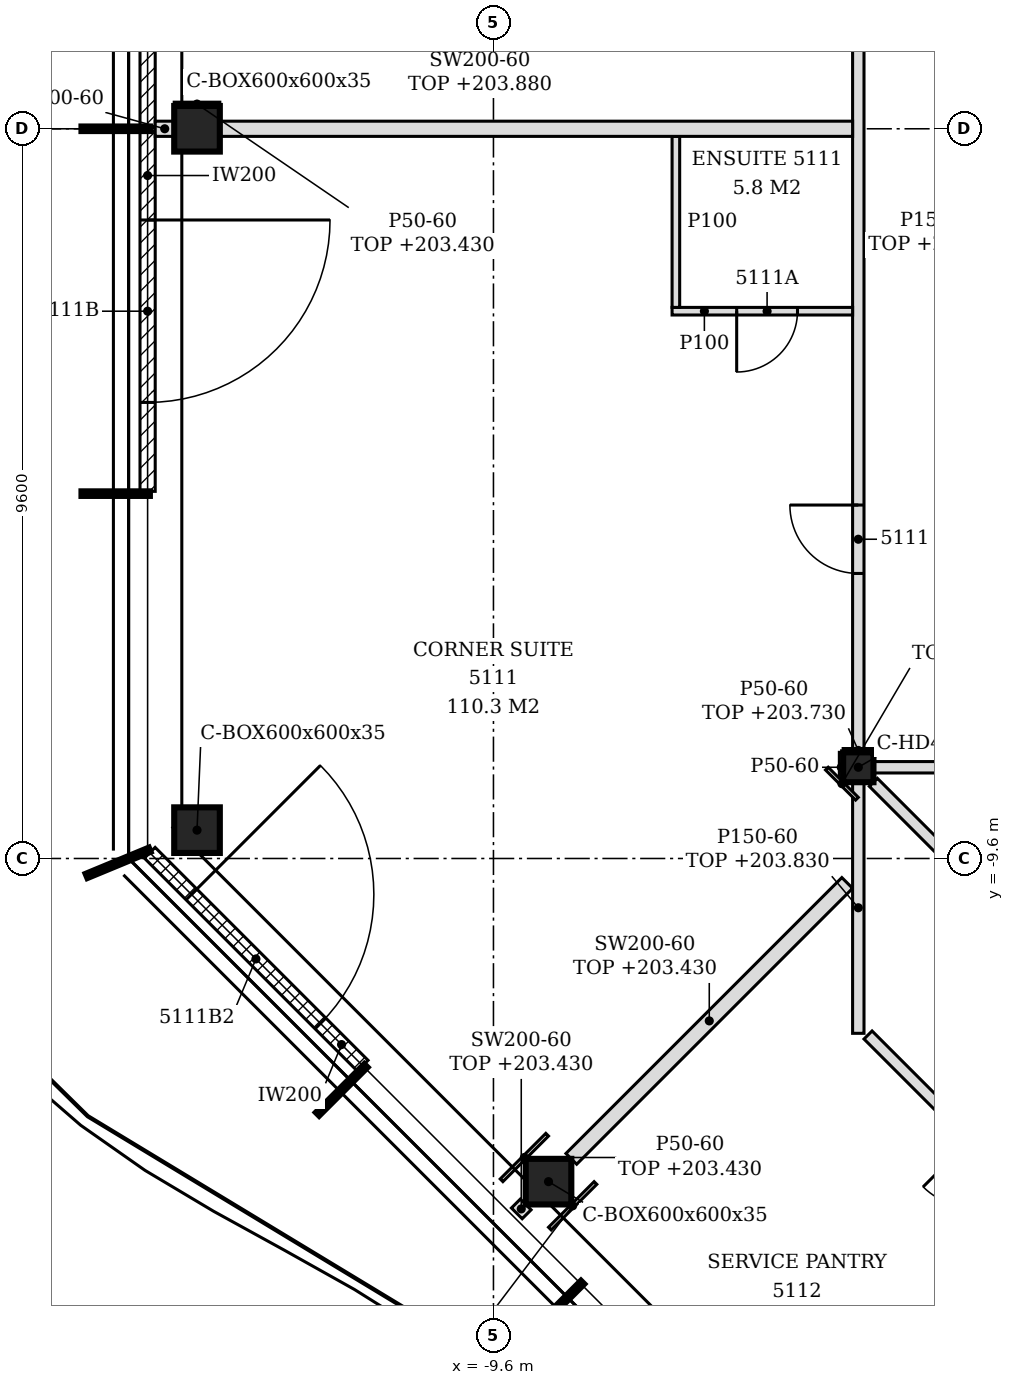
"""IFC4 building model, lengths in metres.
Left out: names, types, materials, properties, quantities, classifications, styles, units other than length and angle.
Written with IfcOpenShell. Run it as: python <this file> out.ifc"""

import sys

from ifc_helpers import new_model, si_unit, direction, frame, frame_2d, origin, origin_2d, place, context, subcontext, project, spatial, polyline, rectangle, hollow_rectangle, i_section, outline, extrude, clip, halfspace, element, fill, save


model = new_model("IFC4")
c1 = context("Model", 3, precision=1e-05, world=origin(), true_north=direction((0.0, 1.0)))
c2 = subcontext(c1, "Body", "Model", "MODEL_VIEW")
j1 = project(units=[si_unit("LENGTHUNIT", "METRE"), si_unit("PLANEANGLEUNIT", "RADIAN")], contexts=[c1])
p1 = place(None, origin())
s1 = spatial("IfcSite", under=j1, at=p1, CompositionType="ELEMENT")
p2 = place(p1, origin())
s2 = spatial("IfcBuilding", under=s1, at=p2, CompositionType="ELEMENT")
p3 = place(p2, frame((0.0, 0.0, 201.0)))
s3 = spatial("IfcBuildingStorey", under=s2, at=p3, CompositionType="ELEMENT", Elevation=201.0)
p4 = place(p3, frame((-13.5, 0.0, -0.15), z_axis=(0.0, 0.0, 1.0), x_axis=(1.0, 0.0, 0.0)))
e1 = element("IfcColumn", 1, at=p4, inside=s3, PredefinedType="COLUMN", context=c2, shape_type="Clipping", body=[
    clip(extrude(hollow_rectangle(XDim=0.6, YDim=0.6, WallThickness=0.035, at=origin_2d()), origin(), (0.0, 0.0, 1.0), 3.5), halfspace(frame((0.0, 0.0, 0.011), z_axis=(0.0, 0.0, 1.0), x_axis=(1.0, 0.0, 0.0)), True)),
])
for number, where, z_axis, x_axis in (
    (2, (-13.5, -9.227, -0.15), (0.0, 0.0, 1.0), (1.0, 0.0, 0.0)),
    (3, (-8.876, -13.852, -0.15), (0.0, 0.0, 1.0), (1.0, 0.0, 0.0)),
):
    element("IfcColumn", number, at=place(p3, frame(where, z_axis=z_axis, x_axis=x_axis)), inside=s3, PredefinedType="COLUMN", context=c2, shape_type="Clipping", body=[
        clip(clip(extrude(hollow_rectangle(XDim=0.6, YDim=0.6, WallThickness=0.035, at=origin_2d()), origin(), (0.0, 0.0, 1.0), 3.5), halfspace(frame((0.0, 0.0, 0.011), z_axis=(0.0, 0.0, 1.0), x_axis=(1.0, 0.0, 0.0)), True)), halfspace(frame((0.0, 0.0, 3.095), z_axis=(0.0, 0.0, 1.0), x_axis=(1.0, 0.0, 0.0)), False)),
    ])
p5 = place(p3, frame((-4.8, -8.4, -0.15), z_axis=(0.0, 0.0, 1.0), x_axis=(1.0, 0.0, 0.0)))
e4 = element("IfcColumn", 4, at=p5, inside=s3, PredefinedType="COLUMN", context=c2, shape_type="SweptSolid", body=[
    extrude(i_section(OverallWidth=0.399, OverallDepth=0.393, WebThickness=0.023, FlangeThickness=0.037, FilletRadius=0.015, at=origin_2d()), origin(), (0.0, 0.0, 1.0), 3.5),
])
p6 = place(p3, frame((-14.15, 4.77, 0.0), z_axis=(0.0, 0.0, 1.0), x_axis=(0.0, -1.0, 0.0)))
e5 = element("IfcWall", 5, at=p6, inside=s3, PredefinedType="NOTDEFINED", context=c2, shape_type="SweptSolid", body=[
    extrude(rectangle(XDim=4.74, YDim=0.2, at=frame_2d((2.37, 0.0))), origin(), (0.0, 0.0, 1.0), 3.35),
])
p7 = place(p6, frame((1.17, 0.0, 0.0)))
e6 = element("IfcOpeningElement", 6, at=p7, cuts=e5, PredefinedType="OPENING", context=c2, shape_type="SweptSolid", body=[
    extrude(rectangle(XDim=2.4, YDim=2.4, at=frame_2d((1.2, 1.2))), frame((0.0, 0.11, 0.0), z_axis=(0.0, -1.0, 0.0), x_axis=(1.0, 0.0, 0.0)), (0.0, 0.0, 1.0), 0.22),
])
p8 = place(p3, frame((-14.15, -0.03, 0.0), z_axis=(0.0, 0.0, 1.0), x_axis=(0.0, -1.0, 0.0)))
e7 = element("IfcWall", 7, at=p8, inside=s3, PredefinedType="NOTDEFINED", context=c2, shape_type="SweptSolid", body=[
    extrude(rectangle(XDim=4.74, YDim=0.2, at=frame_2d((2.37, 0.0))), origin(), (0.0, 0.0, 1.0), 3.35),
])
p9 = place(p8, frame((1.17, 0.0, 0.0)))
e8 = element("IfcOpeningElement", 8, at=p9, cuts=e7, PredefinedType="OPENING", context=c2, shape_type="SweptSolid", body=[
    extrude(rectangle(XDim=2.4, YDim=2.4, at=frame_2d((1.2, 1.2))), frame((0.0, 0.11, 0.0), z_axis=(0.0, -1.0, 0.0), x_axis=(1.0, 0.0, 0.0)), (0.0, 0.0, 1.0), 0.22),
])
p10 = place(p3, frame((-14.122, -9.525, 0.0), z_axis=(0.0, 0.0, 1.0), x_axis=(0.707106781187, -0.707106781187, 0.0)))
e9 = element("IfcWall", 9, at=p10, inside=s3, PredefinedType="NOTDEFINED", context=c2, shape_type="SweptSolid", body=[
    extrude(rectangle(XDim=3.962, YDim=0.2, at=frame_2d((1.981, 0.0))), origin(), (0.0, 0.0, 1.0), 3.35),
])
p11 = place(p10, frame((0.775, 0.0, 0.0)))
e10 = element("IfcOpeningElement", 10, at=p11, cuts=e9, PredefinedType="OPENING", context=c2, shape_type="SweptSolid", body=[
    extrude(rectangle(XDim=2.4, YDim=2.4, at=frame_2d((1.2, 1.2))), frame((0.0, 0.11, 0.0), z_axis=(0.0, -1.0, 0.0), x_axis=(1.0, 0.0, 0.0)), (0.0, 0.0, 1.0), 0.22),
])
p12 = place(p3, frame((2.478, -19.072, 0.0), z_axis=(0.0, 0.0, 1.0), x_axis=(-0.707106781187, 0.707106781187, 0.0)))
e11 = element("IfcWall", 11, at=p12, inside=s3, PredefinedType="PARTITIONING", context=c2, shape_type="SweptSolid", body=[
    extrude(rectangle(XDim=10.112, YDim=0.15, at=frame_2d((5.056, 0.0))), origin(), (0.0, 0.0, 1.0), 2.78),
])
p13 = place(p12, frame((7.286, 0.0, 0.0)))
e12 = element("IfcOpeningElement", 12, at=p13, cuts=e11, PredefinedType="OPENING", context=c2, shape_type="SweptSolid", body=[
    extrude(rectangle(XDim=0.9, YDim=2.1, at=frame_2d((0.45, 1.05))), frame((0.0, 0.085, 0.0), z_axis=(0.0, -1.0, 0.0), x_axis=(1.0, 0.0, 0.0)), (0.0, 0.0, 1.0), 0.17),
])
p14 = place(p12, frame((2.05, 0.0, 0.0)))
e13 = element("IfcOpeningElement", 13, at=p14, cuts=e11, PredefinedType="OPENING", context=c2, shape_type="SweptSolid", body=[
    extrude(rectangle(XDim=0.9, YDim=2.1, at=frame_2d((0.45, 1.05))), frame((0.0, 0.085, 0.0), z_axis=(0.0, -1.0, 0.0), x_axis=(1.0, 0.0, 0.0)), (0.0, 0.0, 1.0), 0.17),
])
p15 = place(p3, frame((-3.952, -18.176, 0.0), z_axis=(0.0, 0.0, 1.0), x_axis=(0.707138590574, 0.707074970368, 0.0)))
e14 = element("IfcWall", 14, at=p15, inside=s3, PredefinedType="PARTITIONING", context=c2, shape_type="SweptSolid", body=[
    extrude(rectangle(XDim=3.837, YDim=0.2, at=frame_2d((1.919, 0.0))), origin(), (0.0, 0.0, 1.0), 2.43),
])
p16 = place(p3, frame((3.472, -16.672, 0.0), z_axis=(0.0, 0.0, 1.0), x_axis=(-0.70709609053, 0.707117471682, 0.0)))
e15 = element("IfcWall", 15, at=p16, inside=s3, PredefinedType="PARTITIONING", context=c2, shape_type="SweptSolid", body=[
    extrude(rectangle(XDim=11.418, YDim=0.15, at=frame_2d((5.709, 0.0))), origin(), (0.0, 0.0, 1.0), 2.78),
])
p17 = place(p16, frame((5.308, 0.0, 0.0)))
e16 = element("IfcOpeningElement", 16, at=p17, cuts=e15, PredefinedType="OPENING", context=c2, shape_type="SweptSolid", body=[
    extrude(rectangle(XDim=0.9, YDim=2.1, at=frame_2d((0.45, 1.05))), frame((0.0, 0.085, 0.0), z_axis=(0.0, -1.0, 0.0), x_axis=(1.0, 0.0, 0.0)), (0.0, 0.0, 1.0), 0.17),
])
p18 = place(p3, frame((-9.293, -14.269, 0.0), z_axis=(0.0, 0.0, 1.0), x_axis=(0.707106781187, 0.707106781187, 0.0)))
e17 = element("IfcWall", 17, at=p18, inside=s3, PredefinedType="PARTITIONING", context=c2, shape_type="SweptSolid", body=[
    extrude(rectangle(XDim=0.166, YDim=0.2, at=frame_2d((0.083, 0.0))), origin(), (0.0, 0.0, 1.0), 2.43),
])
p19 = place(p3, frame((-8.576, -13.552, 0.0), z_axis=(0.0, 0.0, 1.0), x_axis=(0.707106781187, 0.707106781187, 0.0)))
e18 = element("IfcWall", 18, at=p19, inside=s3, PredefinedType="PARTITIONING", context=c2, shape_type="SweptSolid", body=[
    extrude(rectangle(XDim=5.134, YDim=0.2, at=frame_2d((2.567, 0.0))), origin(), (0.0, 0.0, 1.0), 2.43),
])
p20 = place(p3, frame((-4.8, -11.9, 0.0), z_axis=(0.0, 0.0, 1.0), x_axis=(0.0, 1.0, 0.0)))
e19 = element("IfcWall", 19, at=p20, inside=s3, PredefinedType="PARTITIONING", context=c2, shape_type="SweptSolid", body=[
    extrude(rectangle(XDim=3.304, YDim=0.15, at=frame_2d((1.652, 0.0))), origin(), (0.0, 0.0, 1.0), 2.83),
])
p21 = place(p3, frame((-4.601, -8.4, 0.0), z_axis=(0.0, 0.0, 1.0), x_axis=(1.0, 0.0, 0.0)))
e20 = element("IfcWall", 20, at=p21, inside=s3, PredefinedType="PARTITIONING", context=c2, shape_type="SweptSolid", body=[
    extrude(rectangle(XDim=9.476, YDim=0.15, at=frame_2d((4.738, 0.0))), origin(), (0.0, 0.0, 1.0), 2.73),
])
p22 = place(p3, frame((-4.8, -8.204, 0.0), z_axis=(0.0, 0.0, 1.0), x_axis=(0.0, 1.0, 0.0)))
e21 = element("IfcWall", 21, at=p22, inside=s3, PredefinedType="PARTITIONING", context=c2, shape_type="SweptSolid", body=[
    extrude(rectangle(XDim=10.407, YDim=0.15, at=frame_2d((5.204, 0.0))), origin(), (0.0, 0.0, 1.0), 2.73),
])
p23 = place(p22, frame((2.354, 0.0, 0.0)))
e22 = element("IfcOpeningElement", 22, at=p23, cuts=e21, PredefinedType="OPENING", context=c2, shape_type="SweptSolid", body=[
    extrude(rectangle(XDim=0.9, YDim=2.1, at=frame_2d((0.45, 1.05))), frame((0.0, 0.085, 0.0), z_axis=(0.0, -1.0, 0.0), x_axis=(1.0, 0.0, 0.0)), (0.0, 0.0, 1.0), 0.17),
])
p24 = place(p3, frame((-7.25, -2.4, 0.0), z_axis=(0.0, 0.0, 1.0), x_axis=(1.0, 0.0, 0.0)))
e23 = element("IfcWall", 23, at=p24, inside=s3, PredefinedType="PARTITIONING", context=c2, shape_type="SweptSolid", body=[
    extrude(outline(polyline([(0.0, 0.0), (2.375, 0.0), (2.375, 2.73), (2.3, 2.73), (2.298, 3.35), (0.0, 3.35), (0.0, 0.0)])), frame((0.0, 0.05, 0.0), z_axis=(0.0, -1.0, 0.0), x_axis=(1.0, 0.0, 0.0)), (0.0, 0.0, 1.0), 0.1),
])
p25 = place(p24, frame((0.85, 0.0, 0.0)))
e24 = element("IfcOpeningElement", 24, at=p25, cuts=e23, PredefinedType="OPENING", context=c2, shape_type="SweptSolid", body=[
    extrude(rectangle(XDim=0.8, YDim=2.1, at=frame_2d((0.4, 1.05))), frame((0.0, 0.06, 0.0), z_axis=(0.0, -1.0, 0.0), x_axis=(1.0, 0.0, 0.0)), (0.0, 0.0, 1.0), 0.12),
])
p26 = place(p3, frame((-7.2, -2.35, 0.0), z_axis=(0.0, 0.0, 1.0), x_axis=(0.0, 1.0, 0.0)))
e25 = element("IfcWall", 25, at=p26, inside=s3, PredefinedType="PARTITIONING", context=c2, shape_type="SweptSolid", body=[
    extrude(rectangle(XDim=2.25, YDim=0.1, at=frame_2d((1.125, 0.0))), origin(), (0.0, 0.0, 1.0), 3.35),
])
p27 = place(p3, frame((-14.05, 0.0, 0.0), z_axis=(0.0, 0.0, 1.0), x_axis=(1.0, 0.0, 0.0)))
e26 = element("IfcWall", 26, at=p27, inside=s3, PredefinedType="PARTITIONING", context=c2, shape_type="SweptSolid", body=[
    extrude(outline(polyline([(0.0, 0.0), (0.25, 0.0), (0.25, 2.43), (0.1, 2.43), (0.098, 3.35), (0.0, 3.35), (0.0, 0.0)])), frame((0.0, 0.1, 0.0), z_axis=(0.0, -1.0, 0.0), x_axis=(1.0, 0.0, 0.0)), (0.0, 0.0, 1.0), 0.2),
])
p28 = place(p3, frame((-13.2, 0.0, 0.0), z_axis=(0.0, 0.0, 1.0), x_axis=(1.0, 0.0, 0.0)))
e27 = element("IfcWall", 27, at=p28, inside=s3, PredefinedType="PARTITIONING", context=c2, shape_type="SweptSolid", body=[
    extrude(outline(polyline([(0.0, 0.0), (8.325, 0.0), (8.325, 2.73), (8.25, 2.73), (8.248, 2.88), (0.15, 2.88), (0.148, 2.43), (0.0, 2.43), (0.0, 0.0)])), frame((0.0, 0.1, 0.0), z_axis=(0.0, -1.0, 0.0), x_axis=(1.0, 0.0, 0.0)), (0.0, 0.0, 1.0), 0.2),
])
p29 = place(p3, frame((-4.818, -8.814, 0.0), z_axis=(0.0, 0.0, 1.0), x_axis=(-0.707106781187, 0.707106781187, 0.0)))
e28 = element("IfcWall", 28, at=p29, inside=s3, PredefinedType="PARTITIONING", context=c2, shape_type="SweptSolid", body=[
    extrude(rectangle(XDim=0.56, YDim=0.05, at=frame_2d((0.28, 0.0))), origin(), (0.0, 0.0, 1.0), 2.83),
])
for number, where, z_axis, x_axis in (
    (29, (-9.493, -13.834, 0.0), (0.0, 0.0, 1.0), (0.707, 0.707, 0.0)),
    (30, (-8.858, -14.469, 0.0), (0.0, 0.0, 1.0), (0.707, 0.707, 0.0)),
):
    element("IfcWall", number, at=place(p3, frame(where, z_axis=z_axis, x_axis=x_axis)), inside=s3, PredefinedType="PARTITIONING", context=c2, shape_type="SweptSolid", body=[
        extrude(rectangle(XDim=0.848, YDim=0.05, at=frame_2d((0.424, 0.0))), origin(), (0.0, 0.0, 1.0), 2.43),
    ])
p30 = place(p3, frame((-5.024, -8.596, 0.0), z_axis=(0.0, 0.0, 1.0), x_axis=(0.0, 1.0, 0.0)))
e31 = element("IfcWall", 31, at=p30, inside=s3, PredefinedType="PARTITIONING", context=c2, shape_type="SweptSolid", body=[
    extrude(rectangle(XDim=0.393, YDim=0.05, at=frame_2d((0.196, 0.0))), origin(), (0.0, 0.0, 1.0), 3.35),
])
p31 = place(p3, frame((-5.0, -8.178, 0.0), z_axis=(0.0, 0.0, 1.0), x_axis=(1.0, 0.0, 0.0)))
e32 = element("IfcWall", 32, at=p31, inside=s3, PredefinedType="PARTITIONING", context=c2, shape_type="SweptSolid", body=[
    extrude(rectangle(XDim=0.399, YDim=0.05, at=frame_2d((0.199, 0.0))), origin(), (0.0, 0.0, 1.0), 2.73),
])
p32 = place(p3, frame((-13.8, 0.325, 0.0), z_axis=(0.0, 0.0, 1.0), x_axis=(1.0, 0.0, 0.0)))
e33 = element("IfcWall", 33, at=p32, inside=s3, PredefinedType="PARTITIONING", context=c2, shape_type="SweptSolid", body=[
    extrude(rectangle(XDim=0.6, YDim=0.05, at=frame_2d((0.3, 0.0))), origin(), (0.0, 0.0, 1.0), 2.43),
])
p33 = place(p9, origin())
e34 = element("IfcDoor", 34, at=p33, inside=s3, OperationType="SINGLE_SWING_LEFT", PredefinedType="DOOR", context=c2, shape_type="SweptSolid", body=[
    extrude(rectangle(XDim=2.4, YDim=2.4, at=frame_2d((1.2, 1.2))), frame((0.0, 0.025, 0.0), z_axis=(0.0, -1.0, 0.0), x_axis=(1.0, 0.0, 0.0)), (0.0, 0.0, 1.0), 0.05),
])
fill(e8, e34)
p34 = place(p11, origin())
e35 = element("IfcDoor", 35, at=p34, inside=s3, OperationType="SINGLE_SWING_LEFT", PredefinedType="DOOR", context=c2, shape_type="SweptSolid", body=[
    extrude(rectangle(XDim=2.4, YDim=2.4, at=frame_2d((1.2, 1.2))), frame((0.0, 0.025, 0.0), z_axis=(0.0, -1.0, 0.0), x_axis=(1.0, 0.0, 0.0)), (0.0, 0.0, 1.0), 0.05),
])
fill(e10, e35)
p35 = place(p23, origin())
e36 = element("IfcDoor", 36, at=p35, inside=s3, OperationType="SINGLE_SWING_RIGHT", PredefinedType="DOOR", context=c2, shape_type="SweptSolid", body=[
    extrude(rectangle(XDim=0.9, YDim=2.1, at=frame_2d((0.45, 1.05))), frame((0.0, 0.025, 0.0), z_axis=(0.0, -1.0, 0.0), x_axis=(1.0, 0.0, 0.0)), (0.0, 0.0, 1.0), 0.05),
])
fill(e22, e36)
p36 = place(p25, frame((0.8, 0.0, 0.0), z_axis=(0.0, 0.0, 1.0), x_axis=(-1.0, 0.0, 0.0)))
e37 = element("IfcDoor", 37, at=p36, inside=s3, OperationType="SINGLE_SWING_RIGHT", PredefinedType="DOOR", context=c2, shape_type="SweptSolid", body=[
    extrude(rectangle(XDim=0.8, YDim=2.1, at=frame_2d((0.4, 1.05))), frame((0.0, 0.025, 0.0), z_axis=(0.0, -1.0, 0.0), x_axis=(1.0, 0.0, 0.0)), (0.0, 0.0, 1.0), 0.05),
])
fill(e24, e37)
save(model, sys.argv[1])
